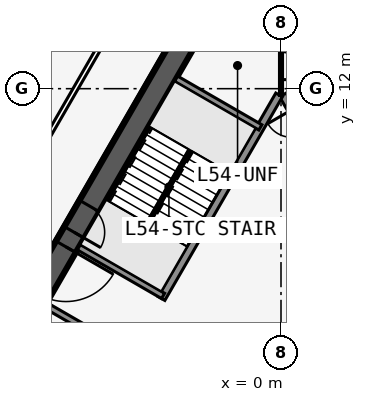
"""IFC4 building model, lengths in metres.
Left out: names, types, materials, properties, quantities, classifications, styles, units other than length and angle.
Written with IfcOpenShell. Run it as: python <this file> out.ifc"""

import sys

from ifc_helpers import new_model, si_unit, direction, frame, frame_2d, origin, place, context, subcontext, project, spatial, rectangle, extrude, element, fill, save


model = new_model("IFC4")
c1 = context("Model", 3, precision=1e-05, world=origin(), true_north=direction((0.0, 1.0)))
c2 = subcontext(c1, "Body", "Model", "MODEL_VIEW")
j1 = project(units=[si_unit("LENGTHUNIT", "METRE"), si_unit("PLANEANGLEUNIT", "RADIAN")], contexts=[c1])
p1 = place(None, origin())
s1 = spatial("IfcSite", under=j1, at=p1, CompositionType="ELEMENT")
p2 = place(p1, origin())
s2 = spatial("IfcBuilding", under=s1, at=p2, CompositionType="ELEMENT")
p3 = place(p2, frame((0.0, 0.0, 204.5)))
s3 = spatial("IfcBuildingStorey", under=s2, at=p3, CompositionType="ELEMENT", Elevation=204.5)
p4 = place(p3, frame((16.5, -9.526, 0.0), z_axis=(0.0, 0.0, 1.0), x_axis=(-0.499999749417, 0.866025548458, 0.0)))
e1 = element("IfcWall", 1, at=p4, inside=s3, PredefinedType="SHEAR", context=c2, shape_type="SweptSolid", body=[
    extrude(rectangle(XDim=33.0, YDim=0.75, at=frame_2d((16.5, 0.0))), origin(), (0.0, 0.0, 1.0), 3.6),
])
p5 = place(p4, frame((14.15, 0.0, 0.0)))
e2 = element("IfcOpeningElement", 2, at=p5, cuts=e1, PredefinedType="OPENING", context=c2, shape_type="SweptSolid", body=[
    extrude(rectangle(XDim=1.8, YDim=2.13, at=frame_2d((0.9, 1.065))), frame((0.0, 0.385, 0.0), z_axis=(0.0, -1.0, 0.0), x_axis=(1.0, 0.0, 0.0)), (0.0, 0.0, 1.0), 0.77),
])
p6 = place(p4, frame((12.6, 0.0, 0.0)))
e3 = element("IfcOpeningElement", 3, at=p6, cuts=e1, PredefinedType="OPENING", context=c2, shape_type="SweptSolid", body=[
    extrude(rectangle(XDim=1.0, YDim=2.13, at=frame_2d((0.5, 1.065))), frame((0.0, 0.385, 0.0), z_axis=(0.0, -1.0, 0.0), x_axis=(1.0, 0.0, 0.0)), (0.0, 0.0, 1.0), 0.77),
])
p7 = place(p3, frame((5.379, 2.586, 0.0), z_axis=(0.0, 0.0, 1.0), x_axis=(-0.500001375892, 0.866024609411, 0.0)))
e4 = element("IfcWall", 4, at=p7, inside=s3, PredefinedType="SOLIDWALL", context=c2, shape_type="SweptSolid", body=[
    extrude(rectangle(XDim=10.633, YDim=0.25, at=frame_2d((5.316, 0.0))), origin(), (0.0, 0.0, 1.0), 3.435),
])
p8 = place(p7, frame((9.164, 0.0, 0.0)))
e5 = element("IfcOpeningElement", 5, at=p8, cuts=e4, PredefinedType="OPENING", context=c2, shape_type="SweptSolid", body=[
    extrude(rectangle(XDim=0.9, YDim=2.13, at=frame_2d((0.45, 1.065))), frame((0.0, 0.135, 0.0), z_axis=(0.0, -1.0, 0.0), x_axis=(1.0, 0.0, 0.0)), (0.0, 0.0, 1.0), 0.27),
])
p9 = place(p7, frame((1.0, 0.0, 0.0)))
e6 = element("IfcOpeningElement", 6, at=p9, cuts=e4, PredefinedType="OPENING", context=c2, shape_type="SweptSolid", body=[
    extrude(rectangle(XDim=1.1, YDim=2.13, at=frame_2d((0.55, 1.065))), frame((0.0, 0.135, 0.0), z_axis=(0.0, -1.0, 0.0), x_axis=(1.0, 0.0, 0.0)), (0.0, 0.0, 1.0), 0.27),
])
p10 = place(p7, frame((3.9, 0.0, 0.0)))
e7 = element("IfcOpeningElement", 7, at=p10, cuts=e4, PredefinedType="OPENING", context=c2, shape_type="SweptSolid", body=[
    extrude(rectangle(XDim=1.1, YDim=2.13, at=frame_2d((0.55, 1.065))), frame((0.0, 0.135, 0.0), z_axis=(0.0, -1.0, 0.0), x_axis=(1.0, 0.0, 0.0)), (0.0, 0.0, 1.0), 0.27),
])
p11 = place(p7, frame((6.8, 0.0, 0.0)))
e8 = element("IfcOpeningElement", 8, at=p11, cuts=e4, PredefinedType="OPENING", context=c2, shape_type="SweptSolid", body=[
    extrude(rectangle(XDim=1.1, YDim=2.13, at=frame_2d((0.55, 1.065))), frame((0.0, 0.135, 0.0), z_axis=(0.0, -1.0, 0.0), x_axis=(1.0, 0.0, 0.0)), (0.0, 0.0, 1.0), 0.27),
])
p12 = place(p3, frame((0.0, 19.052, 0.0), z_axis=(0.0, 0.0, 1.0), x_axis=(-0.499999749417, -0.866025548458, 0.0)))
e9 = element("IfcWall", 9, at=p12, inside=s3, PredefinedType="SHEAR", context=c2, shape_type="SweptSolid", body=[
    extrude(rectangle(XDim=33.0, YDim=0.75, at=frame_2d((16.5, 0.0))), origin(), (0.0, 0.0, 1.0), 3.6),
])
p13 = place(p12, frame((14.15, 0.0, 0.0)))
e10 = element("IfcOpeningElement", 10, at=p13, cuts=e9, PredefinedType="OPENING", context=c2, shape_type="SweptSolid", body=[
    extrude(rectangle(XDim=1.8, YDim=2.13, at=frame_2d((0.9, 1.065))), frame((0.0, 0.385, 0.0), z_axis=(0.0, -1.0, 0.0), x_axis=(1.0, 0.0, 0.0)), (0.0, 0.0, 1.0), 0.77),
])
p14 = place(p12, frame((12.6, 0.0, 0.0)))
e11 = element("IfcOpeningElement", 11, at=p14, cuts=e9, PredefinedType="OPENING", context=c2, shape_type="SweptSolid", body=[
    extrude(rectangle(XDim=1.0, YDim=2.13, at=frame_2d((0.5, 1.065))), frame((0.0, 0.385, 0.0), z_axis=(0.0, -1.0, 0.0), x_axis=(1.0, 0.0, 0.0)), (0.0, 0.0, 1.0), 0.77),
])
p15 = place(p3, frame((-0.062, 11.794, 0.0), z_axis=(0.0, 0.0, 1.0), x_axis=(-0.500006680225, -0.86602154692, 0.0)))
e12 = element("IfcWall", 12, at=p15, inside=s3, PredefinedType="SOLIDWALL", context=c2, shape_type="SweptSolid", body=[
    extrude(rectangle(XDim=7.733, YDim=0.25, at=frame_2d((3.866, 0.0))), origin(), (0.0, 0.0, 1.0), 3.435),
])
for number, where, z_axis, x_axis in (
    (13, (-0.679, 10.727, 0.0), (0.0, 0.0, 1.0), (-0.866, 0.5, 0.0)),
    (14, (-3.879, 5.184, 0.0), (0.0, 0.0, 1.0), (-0.866, 0.5, 0.0)),
    (15, (-4.979, 3.279, 0.0), (0.0, 0.0, 1.0), (-0.866, 0.5, 0.0)),
):
    element("IfcWall", number, at=place(p3, frame(where, z_axis=z_axis, x_axis=x_axis)), inside=s3, PredefinedType="SOLIDWALL", context=c2, shape_type="SweptSolid", body=[
        extrude(rectangle(XDim=3.2, YDim=0.2, at=frame_2d((1.6, 0.0))), origin(), (0.0, 0.0, 1.0), 3.435),
    ])
p16 = place(p3, frame((-0.425, 22.966, 0.0), z_axis=(0.0, 0.0, 1.0), x_axis=(-0.500000265775, -0.866025250339, 0.0)))
e16 = element("IfcWall", 16, at=p16, inside=s3, PredefinedType="PARTITIONING", context=c2, shape_type="SweptSolid", body=[
    extrude(rectangle(XDim=39.354, YDim=0.15, at=frame_2d((19.677, 0.0))), origin(), (0.0, 0.0, 1.0), 3.435),
])
p17 = place(p16, frame((1.102, 0.0, 0.0)))
e17 = element("IfcOpeningElement", 17, at=p17, cuts=e16, PredefinedType="OPENING", context=c2, shape_type="SweptSolid", body=[
    extrude(rectangle(XDim=0.95, YDim=2.13, at=frame_2d((0.475, 1.065))), frame((0.0, 0.085, 0.0), z_axis=(0.0, -1.0, 0.0), x_axis=(1.0, 0.0, 0.0)), (0.0, 0.0, 1.0), 0.17),
])
p18 = place(p16, frame((7.902, 0.0, 0.0)))
e18 = element("IfcOpeningElement", 18, at=p18, cuts=e16, PredefinedType="OPENING", context=c2, shape_type="SweptSolid", body=[
    extrude(rectangle(XDim=0.95, YDim=2.13, at=frame_2d((0.475, 1.065))), frame((0.0, 0.085, 0.0), z_axis=(0.0, -1.0, 0.0), x_axis=(1.0, 0.0, 0.0)), (0.0, 0.0, 1.0), 0.17),
])
p19 = place(p16, frame((17.302, 0.0, 0.0)))
e19 = element("IfcOpeningElement", 19, at=p19, cuts=e16, PredefinedType="OPENING", context=c2, shape_type="SweptSolid", body=[
    extrude(rectangle(XDim=0.95, YDim=2.13, at=frame_2d((0.475, 1.065))), frame((0.0, 0.085, 0.0), z_axis=(0.0, -1.0, 0.0), x_axis=(1.0, 0.0, 0.0)), (0.0, 0.0, 1.0), 0.17),
])
p20 = place(p16, frame((26.702, 0.0, 0.0)))
e20 = element("IfcOpeningElement", 20, at=p20, cuts=e16, PredefinedType="OPENING", context=c2, shape_type="SweptSolid", body=[
    extrude(rectangle(XDim=0.95, YDim=2.13, at=frame_2d((0.475, 1.065))), frame((0.0, 0.085, 0.0), z_axis=(0.0, -1.0, 0.0), x_axis=(1.0, 0.0, 0.0)), (0.0, 0.0, 1.0), 0.17),
])
p21 = place(p16, frame((37.302, 0.0, 0.0)))
e21 = element("IfcOpeningElement", 21, at=p21, cuts=e16, PredefinedType="OPENING", context=c2, shape_type="SweptSolid", body=[
    extrude(rectangle(XDim=0.95, YDim=2.13, at=frame_2d((0.475, 1.065))), frame((0.0, 0.085, 0.0), z_axis=(0.0, -1.0, 0.0), x_axis=(1.0, 0.0, 0.0)), (0.0, 0.0, 1.0), 0.17),
])
p22 = place(p3, frame((0.0, 14.203, 0.0), z_axis=(0.0, 0.0, 1.0), x_axis=(0.0, -1.0, 0.0)))
e22 = element("IfcWall", 22, at=p22, inside=s3, PredefinedType="PARTITIONING", context=c2, shape_type="SweptSolid", body=[
    extrude(rectangle(XDim=2.425, YDim=0.1, at=frame_2d((1.213, 0.0))), origin(), (0.0, 0.0, 1.0), 3.435),
])
p23 = place(p22, frame((1.005, 0.0, 0.0)))
e23 = element("IfcOpeningElement", 23, at=p23, cuts=e22, PredefinedType="OPENING", context=c2, shape_type="SweptSolid", body=[
    extrude(rectangle(XDim=0.9, YDim=2.13, at=frame_2d((0.45, 1.065))), frame((0.0, 0.06, 0.0), z_axis=(0.0, -1.0, 0.0), x_axis=(1.0, 0.0, 0.0)), (0.0, 0.0, 1.0), 0.12),
])
p24 = place(p3, frame((-2.988, 9.978, 0.0), z_axis=(0.0, 0.0, 1.0), x_axis=(-0.499992232847, -0.866029888106, 0.0)))
e24 = element("IfcWall", 24, at=p24, inside=s3, PredefinedType="SOLIDWALL", context=c2, shape_type="SweptSolid", body=[
    extrude(rectangle(XDim=2.794, YDim=0.1, at=frame_2d((1.397, 0.0))), origin(), (0.0, 0.0, 1.0), 3.6),
])
p25 = place(p13, origin())
e25 = element("IfcDoor", 25, at=p25, inside=s3, OperationType="DOUBLE_DOOR_SINGLE_SWING", PredefinedType="DOOR", context=c2, shape_type="SweptSolid", body=[
    extrude(rectangle(XDim=1.8, YDim=2.13, at=frame_2d((0.9, 1.065))), frame((0.0, 0.025, 0.0), z_axis=(0.0, -1.0, 0.0), x_axis=(1.0, 0.0, 0.0)), (0.0, 0.0, 1.0), 0.05),
])
fill(e10, e25)
p26 = place(p14, origin())
e26 = element("IfcDoor", 26, at=p26, inside=s3, OperationType="SINGLE_SWING_RIGHT", PredefinedType="DOOR", context=c2, shape_type="SweptSolid", body=[
    extrude(rectangle(XDim=1.0, YDim=2.13, at=frame_2d((0.5, 1.065))), frame((0.0, 0.025, 0.0), z_axis=(0.0, -1.0, 0.0), x_axis=(1.0, 0.0, 0.0)), (0.0, 0.0, 1.0), 0.05),
])
fill(e11, e26)
p27 = place(p23, origin())
e27 = element("IfcDoor", 27, at=p27, inside=s3, OperationType="SINGLE_SWING_RIGHT", PredefinedType="DOOR", context=c2, shape_type="SweptSolid", body=[
    extrude(rectangle(XDim=0.9, YDim=2.13, at=frame_2d((0.45, 1.065))), frame((0.0, 0.025, 0.0), z_axis=(0.0, -1.0, 0.0), x_axis=(1.0, 0.0, 0.0)), (0.0, 0.0, 1.0), 0.05),
])
fill(e23, e27)
save(model, sys.argv[1])
